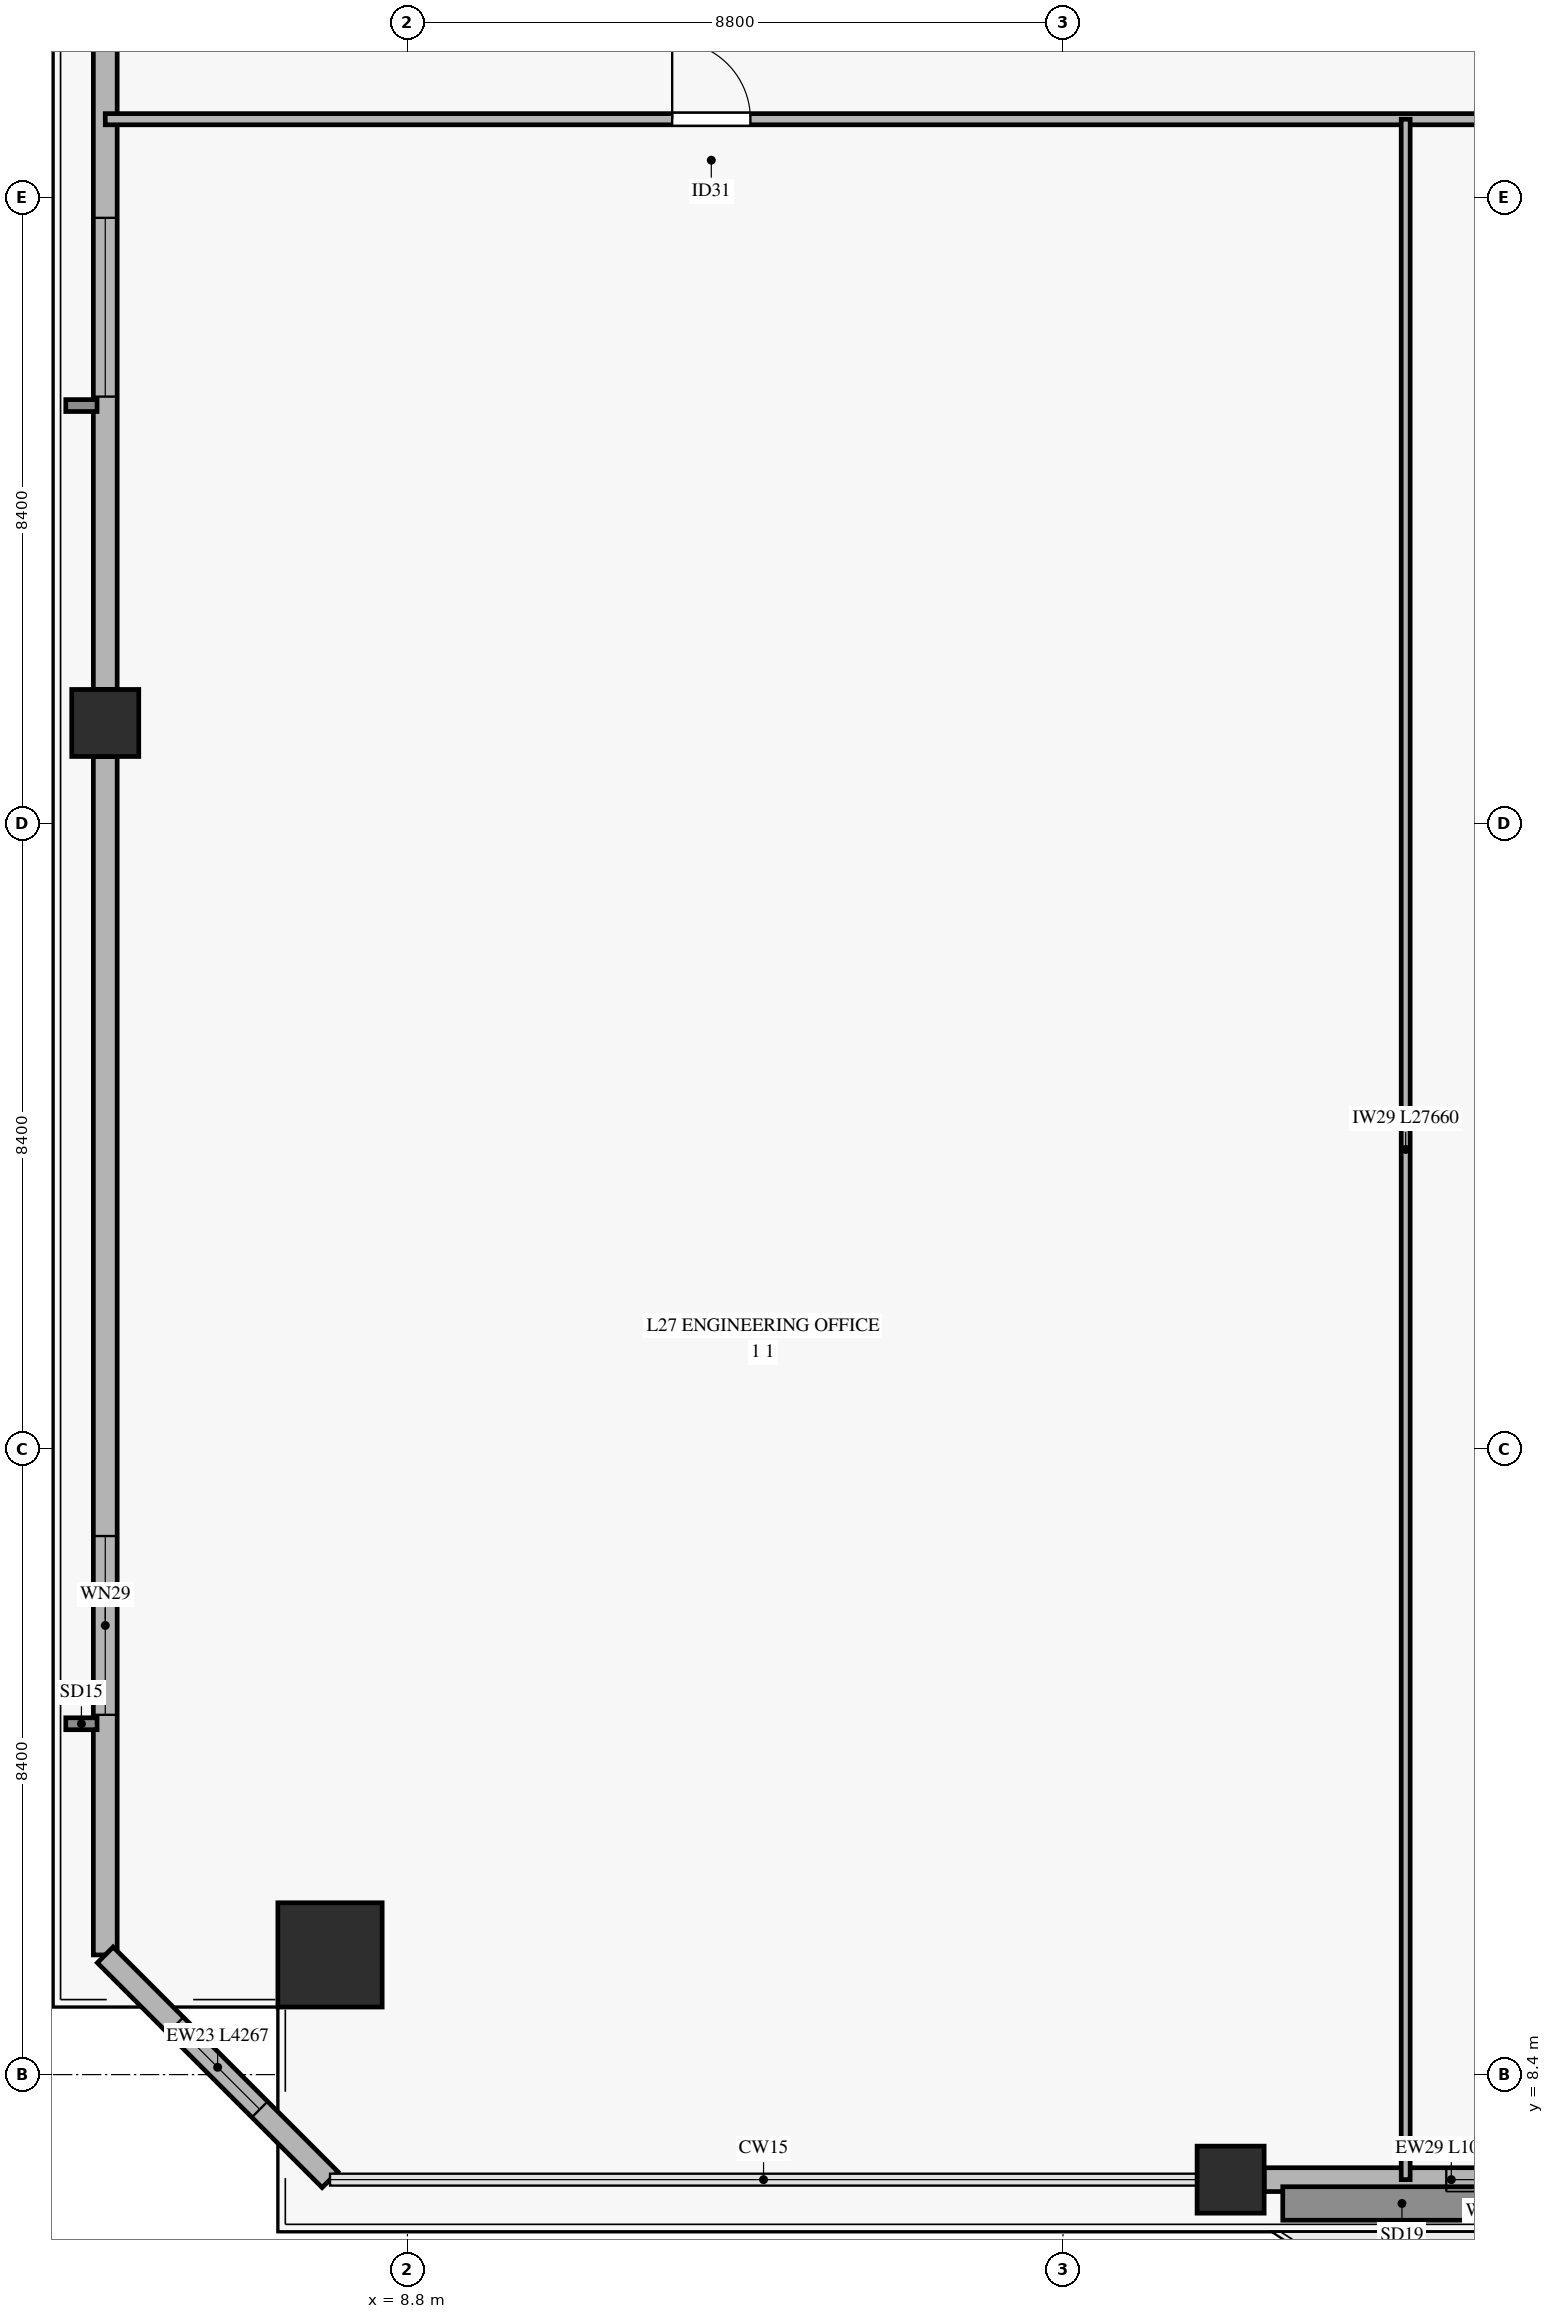
"""IFC4 building model, lengths in metres.
Left out: names, types, materials, properties, quantities, classifications, styles, units other than length and angle.
Written with IfcOpenShell. Run it as: python <this file> out.ifc"""

import sys

from ifc_helpers import new_model, si_unit, direction, frame, frame_2d, origin, origin_2d, place, context, subcontext, project, spatial, rectangle, hollow_rectangle, extrude, source, transform, mapped, element, fill, save


model = new_model("IFC4")
c1 = context("Model", 3, precision=1e-05, world=origin(), true_north=direction((0.0, 1.0)))
c2 = subcontext(c1, "Body", "Model", "MODEL_VIEW")
j1 = project(units=[si_unit("LENGTHUNIT", "METRE"), si_unit("PLANEANGLEUNIT", "RADIAN")], contexts=[c1])
p1 = place(None, origin())
s1 = spatial("IfcSite", under=j1, at=p1, CompositionType="ELEMENT")
p2 = place(p1, origin())
s2 = spatial("IfcBuilding", under=s1, at=p2, CompositionType="ELEMENT")
p3 = place(p2, frame((0.0, 0.0, 111.4)))
s3 = spatial("IfcBuildingStorey", under=s2, at=p3, CompositionType="ELEMENT", Elevation=111.4)
m1 = source(origin(), c2, "Body", "SweptSolid", [
    extrude(hollow_rectangle(XDim=1.4, YDim=1.4, WallThickness=0.065, at=origin_2d()), origin(), (0.0, 0.0, 1.0), 3.68),
])
p4 = place(p3, frame((7.761, 10.007, 0.0), z_axis=(0.0, 0.0, 1.0), x_axis=(1.0, 0.0, 0.0)))
e1 = element("IfcColumn", 1, at=p4, inside=s3, PredefinedType="COLUMN", context=c2, shape_type="MappedRepresentation", body=[
    mapped(m1, transform((0.0, 0.0, 0.0), x_axis=(1.0, 0.0, 0.0), y_axis=(0.0, 1.0, 0.0), z_axis=(0.0, 0.0, 1.0), scale=1.0)),
])
m2 = source(origin(), c2, "Body", "SweptSolid", [
    extrude(hollow_rectangle(XDim=0.9, YDim=0.9, WallThickness=0.04, at=origin_2d()), origin(), (0.0, 0.0, 1.0), 3.68),
])
for number, where, z_axis, x_axis in (
    (2, (19.85, 6.99, 0.0), (0.0, 0.0, 1.0), (1.0, 0.0, 0.0)),
    (3, (4.744, 26.545, 0.0), (0.0, 0.0, 1.0), (1.0, 0.0, 0.0)),
):
    element("IfcColumn", number, at=place(p3, frame(where, z_axis=z_axis, x_axis=x_axis)), inside=s3, PredefinedType="COLUMN", context=c2, shape_type="MappedRepresentation", body=[
        mapped(m2, transform((0.0, 0.0, 0.0), x_axis=(1.0, 0.0, 0.0), y_axis=(0.0, 1.0, 0.0), z_axis=(0.0, 0.0, 1.0), scale=1.0)),
    ])
p5 = place(p3, frame((20.3, 6.99, 0.0), z_axis=(0.0, 0.0, 1.0), x_axis=(1.0, 0.0, 0.0)))
e4 = element("IfcWall", 4, at=p5, inside=s3, PredefinedType="SOLIDWALL", context=c2, shape_type="SweptSolid", body=[
    extrude(rectangle(XDim=10.05, YDim=0.32, at=frame_2d((5.025, 0.0))), origin(), (0.0, 0.0, 1.0), 3.16),
])
p6 = place(p5, frame((4.1, 0.0, 0.0)))
e5 = element("IfcOpeningElement", 5, at=p6, cuts=e4, PredefinedType="OPENING", context=c2, shape_type="SweptSolid", body=[
    extrude(rectangle(XDim=1.8, YDim=2.25, at=frame_2d((0.9, 1.125))), frame((0.0, 0.17, 0.0), z_axis=(0.0, -1.0, 0.0), x_axis=(1.0, 0.0, 0.0)), (0.0, 0.0, 1.0), 0.34),
])
p7 = place(p5, frame((2.445, 0.0, 0.45)))
e6 = element("IfcOpeningElement", 6, at=p7, cuts=e4, PredefinedType="OPENING", context=c2, shape_type="SweptSolid", body=[
    extrude(rectangle(XDim=1.2, YDim=2.0, at=frame_2d((0.6, 1.0))), frame((0.0, 0.17, 0.0), z_axis=(0.0, -1.0, 0.0), x_axis=(1.0, 0.0, 0.0)), (0.0, 0.0, 1.0), 0.34),
])
p8 = place(p5, frame((6.5, 0.0, 0.45)))
e7 = element("IfcOpeningElement", 7, at=p8, cuts=e4, PredefinedType="OPENING", context=c2, shape_type="SweptSolid", body=[
    extrude(rectangle(XDim=1.6, YDim=2.0, at=frame_2d((0.8, 1.0))), frame((0.0, 0.17, 0.0), z_axis=(0.0, -1.0, 0.0), x_axis=(1.0, 0.0, 0.0)), (0.0, 0.0, 1.0), 0.34),
])
p9 = place(p3, frame((4.744, 10.007, 0.0), z_axis=(0.0, 0.0, 1.0), x_axis=(0.0, 1.0, 0.0)))
e8 = element("IfcWall", 8, at=p9, inside=s3, PredefinedType="SOLIDWALL", context=c2, shape_type="SweptSolid", body=[
    extrude(rectangle(XDim=16.088, YDim=0.32, at=frame_2d((8.044, 0.0))), origin(), (0.0, 0.0, 1.0), 3.16),
])
p10 = place(p9, frame((3.223, 0.0, 0.45)))
e9 = element("IfcOpeningElement", 9, at=p10, cuts=e8, PredefinedType="OPENING", context=c2, shape_type="SweptSolid", body=[
    extrude(rectangle(XDim=2.4, YDim=2.1, at=frame_2d((1.2, 1.05))), frame((0.0, 0.17, 0.0), z_axis=(0.0, -1.0, 0.0), x_axis=(1.0, 0.0, 0.0)), (0.0, 0.0, 1.0), 0.34),
])
p11 = place(p3, frame((4.744, 26.995, 0.0), z_axis=(0.0, 0.0, 1.0), x_axis=(0.0, 1.0, 0.0)))
e10 = element("IfcWall", 10, at=p11, inside=s3, PredefinedType="SOLIDWALL", context=c2, shape_type="SweptSolid", body=[
    extrude(rectangle(XDim=16.088, YDim=0.32, at=frame_2d((8.044, 0.0))), origin(), (0.0, 0.0, 1.0), 3.16),
])
p12 = place(p11, frame((3.931, 0.0, 0.45)))
e11 = element("IfcOpeningElement", 11, at=p12, cuts=e10, PredefinedType="OPENING", context=c2, shape_type="SweptSolid", body=[
    extrude(rectangle(XDim=2.4, YDim=2.1, at=frame_2d((1.2, 1.05))), frame((0.0, 0.17, 0.0), z_axis=(0.0, -1.0, 0.0), x_axis=(1.0, 0.0, 0.0)), (0.0, 0.0, 1.0), 0.34),
])
p13 = place(p3, frame((4.744, 10.007, 0.0), z_axis=(0.0, 0.0, 1.0), x_axis=(0.707106781187, -0.707106781187, 0.0)))
e12 = element("IfcWall", 12, at=p13, inside=s3, PredefinedType="SOLIDWALL", context=c2, shape_type="SweptSolid", body=[
    extrude(rectangle(XDim=4.267, YDim=0.3, at=frame_2d((2.133, 0.0))), origin(), (0.0, 0.0, 1.0), 3.16),
])
p14 = place(p13, frame((1.333, 0.0, 0.45)))
e13 = element("IfcOpeningElement", 13, at=p14, cuts=e12, PredefinedType="OPENING", context=c2, shape_type="SweptSolid", body=[
    extrude(rectangle(XDim=1.6, YDim=2.0, at=frame_2d((0.8, 1.0))), frame((0.0, 0.16, 0.0), z_axis=(0.0, -1.0, 0.0), x_axis=(1.0, 0.0, 0.0)), (0.0, 0.0, 1.0), 0.32),
])
p15 = place(p3, frame((4.744, 34.65, 0.0), z_axis=(0.0, 0.0, 1.0), x_axis=(1.0, 0.0, 0.0)))
e14 = element("IfcWall", 14, at=p15, inside=s3, PredefinedType="PARTITIONING", context=c2, shape_type="SweptSolid", body=[
    extrude(rectangle(XDim=60.912, YDim=0.15, at=frame_2d((30.456, 0.0))), origin(), (0.0, 0.0, 1.0), 2.765),
])
p16 = place(p15, frame((7.61, 0.0, 0.0)))
e15 = element("IfcOpeningElement", 15, at=p16, cuts=e14, PredefinedType="OPENING", context=c2, shape_type="SweptSolid", body=[
    extrude(rectangle(XDim=1.05, YDim=2.15, at=frame_2d((0.525, 1.075))), frame((0.0, 0.085, 0.0), z_axis=(0.0, -1.0, 0.0), x_axis=(1.0, 0.0, 0.0)), (0.0, 0.0, 1.0), 0.17),
])
p17 = place(p15, frame((20.391, 0.0, 0.0)))
e16 = element("IfcOpeningElement", 16, at=p17, cuts=e14, PredefinedType="OPENING", context=c2, shape_type="SweptSolid", body=[
    extrude(rectangle(XDim=1.05, YDim=2.15, at=frame_2d((0.525, 1.075))), frame((0.0, 0.085, 0.0), z_axis=(0.0, -1.0, 0.0), x_axis=(1.0, 0.0, 0.0)), (0.0, 0.0, 1.0), 0.17),
])
p18 = place(p15, frame((26.622, 0.0, 0.0)))
e17 = element("IfcOpeningElement", 17, at=p18, cuts=e14, PredefinedType="OPENING", context=c2, shape_type="SweptSolid", body=[
    extrude(rectangle(XDim=1.05, YDim=2.15, at=frame_2d((0.525, 1.075))), frame((0.0, 0.085, 0.0), z_axis=(0.0, -1.0, 0.0), x_axis=(1.0, 0.0, 0.0)), (0.0, 0.0, 1.0), 0.17),
])
p19 = place(p15, frame((32.462, 0.0, 0.0)))
e18 = element("IfcOpeningElement", 18, at=p19, cuts=e14, PredefinedType="OPENING", context=c2, shape_type="SweptSolid", body=[
    extrude(rectangle(XDim=1.05, YDim=2.15, at=frame_2d((0.525, 1.075))), frame((0.0, 0.085, 0.0), z_axis=(0.0, -1.0, 0.0), x_axis=(1.0, 0.0, 0.0)), (0.0, 0.0, 1.0), 0.17),
])
p20 = place(p15, frame((37.919, 0.0, 0.0)))
e19 = element("IfcOpeningElement", 19, at=p20, cuts=e14, PredefinedType="OPENING", context=c2, shape_type="SweptSolid", body=[
    extrude(rectangle(XDim=1.05, YDim=2.15, at=frame_2d((0.525, 1.075))), frame((0.0, 0.085, 0.0), z_axis=(0.0, -1.0, 0.0), x_axis=(1.0, 0.0, 0.0)), (0.0, 0.0, 1.0), 0.17),
])
p21 = place(p15, frame((48.844, 0.0, 0.0)))
e20 = element("IfcOpeningElement", 20, at=p21, cuts=e14, PredefinedType="OPENING", context=c2, shape_type="SweptSolid", body=[
    extrude(rectangle(XDim=1.05, YDim=2.15, at=frame_2d((0.525, 1.075))), frame((0.0, 0.085, 0.0), z_axis=(0.0, -1.0, 0.0), x_axis=(1.0, 0.0, 0.0)), (0.0, 0.0, 1.0), 0.17),
])
p22 = place(p3, frame((22.2, 6.99, 0.0), z_axis=(0.0, 0.0, 1.0), x_axis=(0.0, 1.0, 0.0)))
e21 = element("IfcWall", 21, at=p22, inside=s3, PredefinedType="PARTITIONING", context=c2, shape_type="SweptSolid", body=[
    extrude(rectangle(XDim=27.66, YDim=0.12, at=frame_2d((13.83, 0.0))), origin(), (0.0, 0.0, 1.0), 3.165),
])
m3 = source(origin(), c2, "Body", "SweptSolid", [
    extrude(rectangle(XDim=1.2, YDim=2.0, at=frame_2d((0.6, 1.0))), frame((0.0, 0.03, 0.0), z_axis=(0.0, -1.0, 0.0), x_axis=(1.0, 0.0, 0.0)), (0.0, 0.0, 1.0), 0.06),
])
p23 = place(p7, origin())
e22 = element("IfcWindow", 22, at=p23, inside=s3, PartitioningType="SINGLE_PANEL", PredefinedType="WINDOW", context=c2, shape_type="MappedRepresentation", body=[
    mapped(m3, transform((0.0, 0.0, 0.0), x_axis=(1.0, 0.0, 0.0), y_axis=(0.0, 1.0, 0.0), z_axis=(0.0, 0.0, 1.0), scale=1.0)),
])
fill(e6, e22)
m4 = source(origin(), c2, "Body", "SweptSolid", [
    extrude(rectangle(XDim=2.4, YDim=2.1, at=frame_2d((1.2, 1.05))), frame((0.0, 0.03, 0.0), z_axis=(0.0, -1.0, 0.0), x_axis=(1.0, 0.0, 0.0)), (0.0, 0.0, 1.0), 0.06),
])
p24 = place(p10, origin())
e23 = element("IfcWindow", 23, at=p24, inside=s3, PartitioningType="SINGLE_PANEL", PredefinedType="WINDOW", context=c2, shape_type="MappedRepresentation", body=[
    mapped(m4, transform((0.0, 0.0, 0.0), x_axis=(1.0, 0.0, 0.0), y_axis=(0.0, 1.0, 0.0), z_axis=(0.0, 0.0, 1.0), scale=1.0)),
])
fill(e9, e23)
p25 = place(p12, origin())
e24 = element("IfcWindow", 24, at=p25, inside=s3, PartitioningType="SINGLE_PANEL", PredefinedType="WINDOW", context=c2, shape_type="MappedRepresentation", body=[
    mapped(m4, transform((0.0, 0.0, 0.0), x_axis=(1.0, 0.0, 0.0), y_axis=(0.0, 1.0, 0.0), z_axis=(0.0, 0.0, 1.0), scale=1.0)),
])
fill(e11, e24)
m5 = source(origin(), c2, "Body", "SweptSolid", [
    extrude(rectangle(XDim=1.6, YDim=2.0, at=frame_2d((0.8, 1.0))), frame((0.0, 0.03, 0.0), z_axis=(0.0, -1.0, 0.0), x_axis=(1.0, 0.0, 0.0)), (0.0, 0.0, 1.0), 0.06),
])
p26 = place(p14, origin())
e25 = element("IfcWindow", 25, at=p26, inside=s3, PartitioningType="SINGLE_PANEL", PredefinedType="WINDOW", context=c2, shape_type="MappedRepresentation", body=[
    mapped(m5, transform((0.0, 0.0, 0.0), x_axis=(1.0, 0.0, 0.0), y_axis=(0.0, 1.0, 0.0), z_axis=(0.0, 0.0, 1.0), scale=1.0)),
])
fill(e13, e25)
m6 = source(origin(), c2, "Body", "SweptSolid", [
    extrude(rectangle(XDim=1.05, YDim=2.15, at=frame_2d((0.525, 1.075))), frame((0.0, 0.025, 0.0), z_axis=(0.0, -1.0, 0.0), x_axis=(1.0, 0.0, 0.0)), (0.0, 0.0, 1.0), 0.05),
])
p27 = place(p16, origin())
e26 = element("IfcDoor", 26, at=p27, inside=s3, OperationType="SINGLE_SWING_LEFT", PredefinedType="DOOR", context=c2, shape_type="MappedRepresentation", body=[
    mapped(m6, transform((0.0, 0.0, 0.0), x_axis=(1.0, 0.0, 0.0), y_axis=(0.0, 1.0, 0.0), z_axis=(0.0, 0.0, 1.0), scale=1.0)),
])
fill(e15, e26)
save(model, sys.argv[1])
